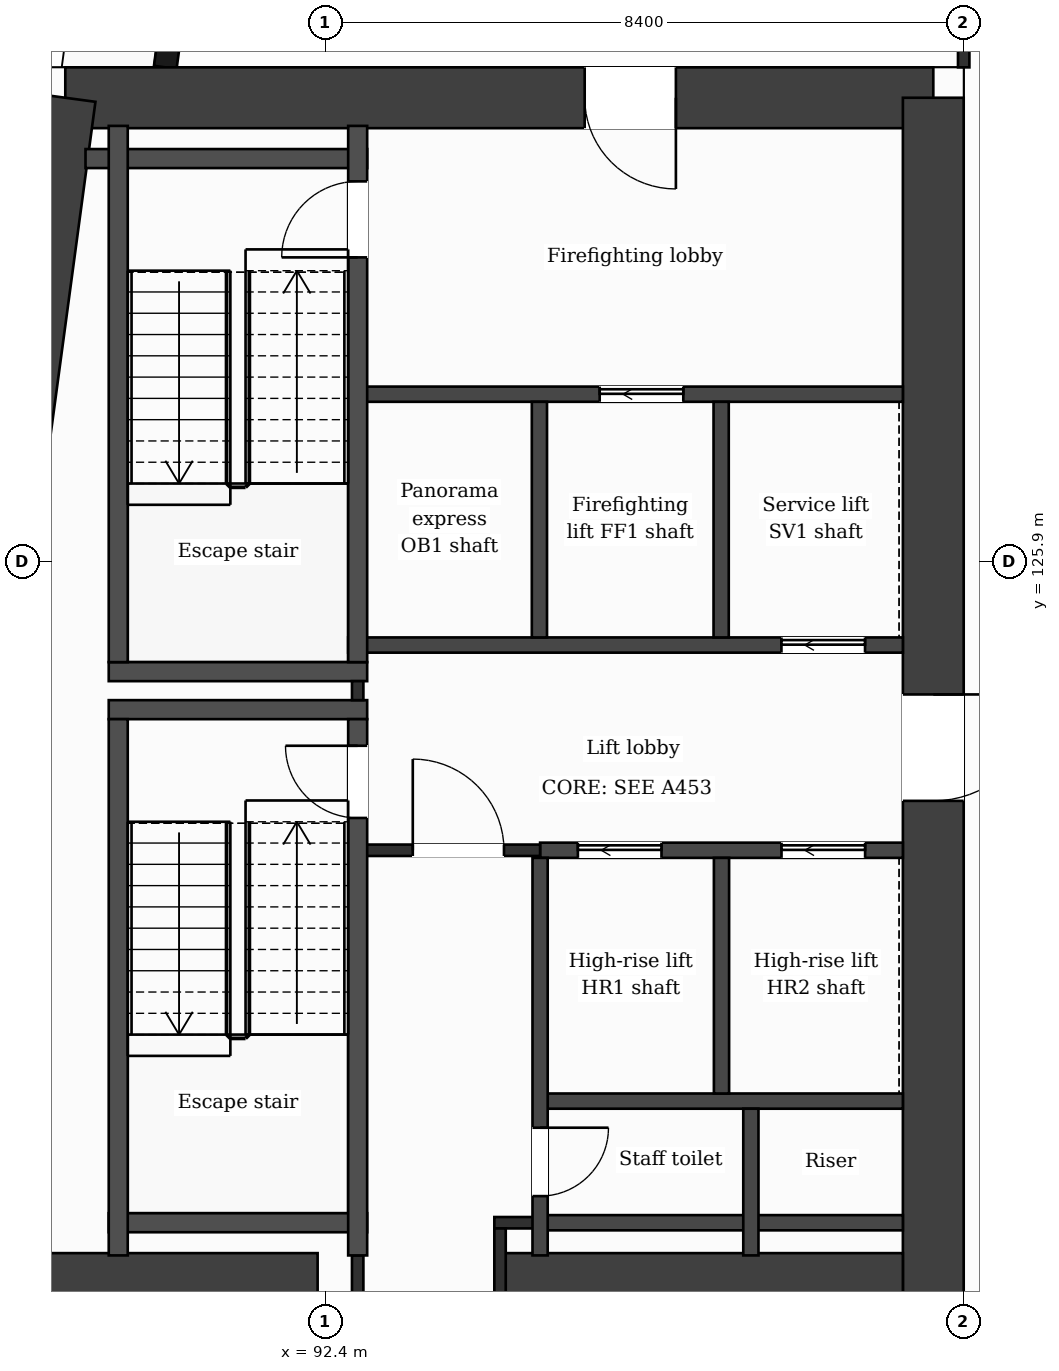
"""IFC4 building model, lengths in metres.
Left out: names, types, materials, properties, quantities, classifications, styles, units other than length and angle.
Written with IfcOpenShell. Run it as: python <this file> out.ifc"""

import sys

from ifc_helpers import new_model, si_unit, direction, frame, frame_2d, origin, place, context, subcontext, project, spatial, rectangle, extrude, element, fill, save


model = new_model("IFC4")
c1 = context("Model", 3, precision=1e-05, world=origin(), true_north=direction((0.0, 1.0)))
c2 = subcontext(c1, "Body", "Model", "MODEL_VIEW")
j1 = project(units=[si_unit("LENGTHUNIT", "METRE"), si_unit("PLANEANGLEUNIT", "RADIAN")], contexts=[c1])
p1 = place(None, origin())
s1 = spatial("IfcSite", under=j1, at=p1, CompositionType="ELEMENT")
p2 = place(p1, origin())
s2 = spatial("IfcBuilding", under=s1, at=p2, CompositionType="ELEMENT")
p3 = place(p2, frame((0.0, 0.0, 217.0)))
s3 = spatial("IfcBuildingStorey", under=s2, at=p3, CompositionType="ELEMENT", Elevation=217.0)
p4 = place(p3, frame((88.98, 132.0, 0.0), z_axis=(0.0, 0.0, 1.0), x_axis=(1.0, 0.0, 0.0)))
e1 = element("IfcWall", 1, at=p4, inside=s3, PredefinedType="SHEAR", context=c2, shape_type="SweptSolid", body=[
    extrude(rectangle(XDim=11.419, YDim=0.8, at=frame_2d((5.71, 0.0))), origin(), (0.0, 0.0, 1.0), 3.7),
])
p5 = place(p4, frame((6.833, 0.0, 0.0)))
e2 = element("IfcOpeningElement", 2, at=p5, cuts=e1, PredefinedType="OPENING", context=c2, shape_type="SweptSolid", body=[
    extrude(rectangle(XDim=1.2, YDim=2.1, at=frame_2d((0.6, 1.05))), frame((0.0, 0.41, 0.0), z_axis=(0.0, -1.0, 0.0), x_axis=(1.0, 0.0, 0.0)), (0.0, 0.0, 1.0), 0.82),
])
p6 = place(p3, frame((100.4, 132.0, 0.0), z_axis=(0.0, 0.0, 1.0), x_axis=(0.0, -1.0, 0.0)))
e3 = element("IfcWall", 3, at=p6, inside=s3, PredefinedType="SHEAR", context=c2, shape_type="SweptSolid", body=[
    extrude(rectangle(XDim=21.2, YDim=0.8, at=frame_2d((10.6, 0.0))), origin(), (0.0, 0.0, 1.0), 3.7),
])
p7 = place(p6, frame((7.85, 0.0, 0.0)))
e4 = element("IfcOpeningElement", 4, at=p7, cuts=e3, PredefinedType="OPENING", context=c2, shape_type="SweptSolid", body=[
    extrude(rectangle(XDim=1.4, YDim=2.1, at=frame_2d((0.7, 1.05))), frame((0.0, 0.41, 0.0), z_axis=(0.0, -1.0, 0.0), x_axis=(1.0, 0.0, 0.0)), (0.0, 0.0, 1.0), 0.82),
])
p8 = place(p3, frame((86.127, 110.8, 0.0), z_axis=(0.0, 0.0, 1.0), x_axis=(0.133408347329, 0.991061154956, 0.0)))
e5 = element("IfcWall", 5, at=p8, inside=s3, PredefinedType="SHEAR", context=c2, shape_type="SweptSolid", body=[
    extrude(rectangle(XDim=21.391, YDim=0.8, at=frame_2d((10.696, 0.0))), origin(), (0.0, 0.0, 1.0), 3.7),
])
p9 = place(p3, frame((87.223, 116.4, 0.0), z_axis=(0.0, 0.0, 1.0), x_axis=(1.0, 0.0, 0.0)))
e6 = element("IfcWall", 6, at=p9, inside=s3, PredefinedType="SHEAR", context=c2, shape_type="SweptSolid", body=[
    extrude(rectangle(XDim=5.077, YDim=0.8, at=frame_2d((2.539, 0.0))), origin(), (0.0, 0.0, 1.0), 3.7),
])
p10 = place(p3, frame((94.7, 116.4, 0.0), z_axis=(0.0, 0.0, 1.0), x_axis=(1.0, 0.0, 0.0)))
e7 = element("IfcWall", 7, at=p10, inside=s3, PredefinedType="SHEAR", context=c2, shape_type="SweptSolid", body=[
    extrude(rectangle(XDim=5.3, YDim=0.8, at=frame_2d((2.65, 0.0))), origin(), (0.0, 0.0, 1.0), 3.7),
])
p11 = place(p3, frame((91.177, 138.95, 0.0), z_axis=(0.0, 0.0, 1.0), x_axis=(-0.133426664613, -0.991058689065, 0.0)))
e8 = element("IfcWall", 8, at=p11, inside=s3, PredefinedType="SOLIDWALL", context=c2, shape_type="SweptSolid", body=[
    extrude(rectangle(XDim=6.609, YDim=0.3, at=frame_2d((3.305, 0.0))), origin(), (0.0, 0.0, 1.0), 3.38),
])
p12 = place(p11, frame((1.039, 0.0, 0.9)))
e9 = element("IfcOpeningElement", 9, at=p12, cuts=e8, PredefinedType="OPENING", context=c2, shape_type="SweptSolid", body=[
    extrude(rectangle(XDim=1.2, YDim=2.1, at=frame_2d((0.6, 1.05))), frame((0.0, 0.16, 0.0), z_axis=(0.0, -1.0, 0.0), x_axis=(1.0, 0.0, 0.0)), (0.0, 0.0, 1.0), 0.32),
])
p13 = place(p11, frame((4.294, 0.0, 0.0)))
e10 = element("IfcOpeningElement", 10, at=p13, cuts=e8, PredefinedType="OPENING", context=c2, shape_type="SweptSolid", body=[
    extrude(rectangle(XDim=1.2, YDim=2.4, at=frame_2d((0.6, 1.2))), frame((0.0, 0.16, 0.0), z_axis=(0.0, -1.0, 0.0), x_axis=(1.0, 0.0, 0.0)), (0.0, 0.0, 1.0), 0.32),
])
p14 = place(p3, frame((95.227, 117.2, 0.0), z_axis=(0.0, 0.0, 1.0), x_axis=(1.0, 0.0, 0.0)))
e11 = element("IfcWall", 11, at=p14, inside=s3, PredefinedType="PARTITIONING", context=c2, shape_type="SweptSolid", body=[
    extrude(rectangle(XDim=4.773, YDim=0.2, at=frame_2d((2.386, 0.0))), origin(), (0.0, 0.0, 1.0), 3.38),
])
p15 = place(p3, frame((94.625, 117.2, 0.0), z_axis=(0.0, 0.0, 1.0), x_axis=(1.0, 0.0, 0.0)))
e12 = element("IfcWall", 12, at=p15, inside=s3, PredefinedType="PARTITIONING", context=c2, shape_type="SweptSolid", body=[
    extrude(rectangle(XDim=0.602, YDim=0.15, at=frame_2d((0.301, 0.0))), origin(), (0.0, 0.0, 1.0), 3.38),
])
p16 = place(p3, frame((89.552, 117.2, 0.0), z_axis=(0.0, 0.0, 1.0), x_axis=(1.0, 0.0, 0.0)))
e13 = element("IfcWall", 13, at=p16, inside=s3, PredefinedType="PARTITIONING", context=c2, shape_type="SweptSolid", body=[
    extrude(rectangle(XDim=3.4, YDim=0.25, at=frame_2d((1.7, 0.0))), origin(), (0.0, 0.0, 1.0), 3.38),
])
p17 = place(p3, frame((95.227, 118.8, 0.0), z_axis=(0.0, 0.0, 1.0), x_axis=(1.0, 0.0, 0.0)))
e14 = element("IfcWall", 14, at=p17, inside=s3, PredefinedType="PARTITIONING", context=c2, shape_type="SweptSolid", body=[
    extrude(rectangle(XDim=4.773, YDim=0.2, at=frame_2d((2.386, 0.0))), origin(), (0.0, 0.0, 1.0), 3.38),
])
p18 = place(p3, frame((95.227, 122.1, 0.0), z_axis=(0.0, 0.0, 1.0), x_axis=(1.0, 0.0, 0.0)))
e15 = element("IfcWall", 15, at=p18, inside=s3, PredefinedType="PARTITIONING", context=c2, shape_type="SweptSolid", body=[
    extrude(rectangle(XDim=4.773, YDim=0.2, at=frame_2d((2.386, 0.0))), origin(), (0.0, 0.0, 1.0), 3.38),
])
p19 = place(p18, frame((0.497, 0.0, 0.0)))
e16 = element("IfcOpeningElement", 16, at=p19, cuts=e15, PredefinedType="OPENING", context=c2, shape_type="SweptSolid", body=[
    extrude(rectangle(XDim=1.1, YDim=2.1, at=frame_2d((0.55, 1.05))), frame((0.0, 0.11, 0.0), z_axis=(0.0, -1.0, 0.0), x_axis=(1.0, 0.0, 0.0)), (0.0, 0.0, 1.0), 0.22),
])
p20 = place(p18, frame((3.176, 0.0, 0.0)))
e17 = element("IfcOpeningElement", 17, at=p20, cuts=e15, PredefinedType="OPENING", context=c2, shape_type="SweptSolid", body=[
    extrude(rectangle(XDim=1.1, YDim=2.1, at=frame_2d((0.55, 1.05))), frame((0.0, 0.11, 0.0), z_axis=(0.0, -1.0, 0.0), x_axis=(1.0, 0.0, 0.0)), (0.0, 0.0, 1.0), 0.22),
])
p21 = place(p3, frame((92.827, 122.1, 0.0), z_axis=(0.0, 0.0, 1.0), x_axis=(1.0, 0.0, 0.0)))
e18 = element("IfcWall", 18, at=p21, inside=s3, PredefinedType="PARTITIONING", context=c2, shape_type="SweptSolid", body=[
    extrude(rectangle(XDim=2.4, YDim=0.15, at=frame_2d((1.2, 0.0))), origin(), (0.0, 0.0, 1.0), 3.38),
])
p22 = place(p21, frame((0.725, 0.0, 0.0)))
e19 = element("IfcOpeningElement", 19, at=p22, cuts=e18, PredefinedType="OPENING", context=c2, shape_type="SweptSolid", body=[
    extrude(rectangle(XDim=1.2, YDim=2.1, at=frame_2d((0.6, 1.05))), frame((0.0, 0.085, 0.0), z_axis=(0.0, -1.0, 0.0), x_axis=(1.0, 0.0, 0.0)), (0.0, 0.0, 1.0), 0.17),
])
for number, where, z_axis, x_axis in (
    (20, (89.552, 123.95, 0.0), (0.0, 0.0, 1.0), (1.0, 0.0, 0.0)),
    (21, (89.552, 124.45, 0.0), (0.0, 0.0, 1.0), (1.0, 0.0, 0.0)),
):
    element("IfcWall", number, at=place(p3, frame(where, z_axis=z_axis, x_axis=x_axis)), inside=s3, PredefinedType="PARTITIONING", context=c2, shape_type="SweptSolid", body=[
        extrude(rectangle(XDim=3.4, YDim=0.25, at=frame_2d((1.7, 0.0))), origin(), (0.0, 0.0, 1.0), 3.38),
    ])
p23 = place(p3, frame((92.702, 124.8, 0.0), z_axis=(0.0, 0.0, 1.0), x_axis=(1.0, 0.0, 0.0)))
e22 = element("IfcWall", 22, at=p23, inside=s3, PredefinedType="PARTITIONING", context=c2, shape_type="SweptSolid", body=[
    extrude(rectangle(XDim=7.298, YDim=0.2, at=frame_2d((3.649, 0.0))), origin(), (0.0, 0.0, 1.0), 3.38),
])
p24 = place(p23, frame((5.7, 0.0, 0.0)))
e23 = element("IfcOpeningElement", 23, at=p24, cuts=e22, PredefinedType="OPENING", context=c2, shape_type="SweptSolid", body=[
    extrude(rectangle(XDim=1.1, YDim=2.1, at=frame_2d((0.55, 1.05))), frame((0.0, 0.11, 0.0), z_axis=(0.0, -1.0, 0.0), x_axis=(1.0, 0.0, 0.0)), (0.0, 0.0, 1.0), 0.22),
])
p25 = place(p3, frame((92.827, 128.1, 0.0), z_axis=(0.0, 0.0, 1.0), x_axis=(1.0, 0.0, 0.0)))
e24 = element("IfcWall", 24, at=p25, inside=s3, PredefinedType="PARTITIONING", context=c2, shape_type="SweptSolid", body=[
    extrude(rectangle(XDim=7.173, YDim=0.2, at=frame_2d((3.586, 0.0))), origin(), (0.0, 0.0, 1.0), 3.38),
])
p26 = place(p25, frame((3.184, 0.0, 0.0)))
e25 = element("IfcOpeningElement", 25, at=p26, cuts=e24, PredefinedType="OPENING", context=c2, shape_type="SweptSolid", body=[
    extrude(rectangle(XDim=1.1, YDim=2.1, at=frame_2d((0.55, 1.05))), frame((0.0, 0.11, 0.0), z_axis=(0.0, -1.0, 0.0), x_axis=(1.0, 0.0, 0.0)), (0.0, 0.0, 1.0), 0.22),
])
p27 = place(p3, frame((89.246, 131.2, 0.0), z_axis=(0.0, 0.0, 1.0), x_axis=(1.0, 0.0, 0.0)))
e26 = element("IfcWall", 26, at=p27, inside=s3, PredefinedType="PARTITIONING", context=c2, shape_type="SweptSolid", body=[
    extrude(rectangle(XDim=3.706, YDim=0.25, at=frame_2d((1.853, 0.0))), origin(), (0.0, 0.0, 1.0), 3.38),
])
for number, where, z_axis, x_axis in (
    (27, (89.677, 116.77, 0.0), (0.0, 0.0, 1.0), (0.0, 1.0, 0.0)),
    (28, (89.677, 124.575, 0.0), (0.0, 0.0, 1.0), (0.0, 1.0, 0.0)),
):
    element("IfcWall", number, at=place(p3, frame(where, z_axis=z_axis, x_axis=x_axis)), inside=s3, PredefinedType="PARTITIONING", context=c2, shape_type="SweptSolid", body=[
        extrude(rectangle(XDim=7.055, YDim=0.25, at=frame_2d((3.527, 0.0))), origin(), (0.0, 0.0, 1.0), 3.38),
    ])
p28 = place(p3, frame((92.827, 116.0, 0.0), z_axis=(0.0, 0.0, 1.0), x_axis=(0.0, 1.0, 0.0)))
e29 = element("IfcWall", 29, at=p28, inside=s3, PredefinedType="PARTITIONING", context=c2, shape_type="SweptSolid", body=[
    extrude(rectangle(XDim=0.77, YDim=0.15, at=frame_2d((0.385, 0.0))), origin(), (0.0, 0.0, 1.0), 3.38),
])
p29 = place(p3, frame((92.827, 124.075, 0.0), z_axis=(0.0, 0.0, 1.0), x_axis=(0.0, 1.0, 0.0)))
e30 = element("IfcWall", 30, at=p29, inside=s3, PredefinedType="PARTITIONING", context=c2, shape_type="SweptSolid", body=[
    extrude(rectangle(XDim=0.25, YDim=0.15, at=frame_2d((0.125, 0.0))), origin(), (0.0, 0.0, 1.0), 3.38),
])
p30 = place(p3, frame((92.827, 116.77, 0.0), z_axis=(0.0, 0.0, 1.0), x_axis=(0.0, 1.0, 0.0)))
e31 = element("IfcWall", 31, at=p30, inside=s3, PredefinedType="PARTITIONING", context=c2, shape_type="SweptSolid", body=[
    extrude(rectangle(XDim=7.055, YDim=0.25, at=frame_2d((3.527, 0.0))), origin(), (0.0, 0.0, 1.0), 3.38),
])
p31 = place(p30, frame((5.755, 0.0, 0.0)))
e32 = element("IfcOpeningElement", 32, at=p31, cuts=e31, PredefinedType="OPENING", context=c2, shape_type="SweptSolid", body=[
    extrude(rectangle(XDim=0.95, YDim=2.1, at=frame_2d((0.475, 1.05))), frame((0.0, 0.135, 0.0), z_axis=(0.0, -1.0, 0.0), x_axis=(1.0, 0.0, 0.0)), (0.0, 0.0, 1.0), 0.27),
])
p32 = place(p3, frame((92.827, 124.575, 0.0), z_axis=(0.0, 0.0, 1.0), x_axis=(0.0, 1.0, 0.0)))
e33 = element("IfcWall", 33, at=p32, inside=s3, PredefinedType="PARTITIONING", context=c2, shape_type="SweptSolid", body=[
    extrude(rectangle(XDim=7.055, YDim=0.25, at=frame_2d((3.527, 0.0))), origin(), (0.0, 0.0, 1.0), 3.38),
])
p33 = place(p32, frame((5.325, 0.0, 0.0)))
e34 = element("IfcOpeningElement", 34, at=p33, cuts=e33, PredefinedType="OPENING", context=c2, shape_type="SweptSolid", body=[
    extrude(rectangle(XDim=1.0, YDim=2.1, at=frame_2d((0.5, 1.05))), frame((0.0, 0.135, 0.0), z_axis=(0.0, -1.0, 0.0), x_axis=(1.0, 0.0, 0.0)), (0.0, 0.0, 1.0), 0.27),
])
p34 = place(p3, frame((94.7, 116.0, 0.0), z_axis=(0.0, 0.0, 1.0), x_axis=(0.0, 1.0, 0.0)))
e35 = element("IfcWall", 35, at=p34, inside=s3, PredefinedType="PARTITIONING", context=c2, shape_type="SweptSolid", body=[
    extrude(rectangle(XDim=1.125, YDim=0.15, at=frame_2d((0.562, 0.0))), origin(), (0.0, 0.0, 1.0), 3.38),
])
p35 = place(p3, frame((95.218, 124.9, 0.0), z_axis=(0.0, 0.0, 1.0), x_axis=(0.0, 1.0, 0.0)))
e36 = element("IfcWall", 36, at=p35, inside=s3, PredefinedType="PARTITIONING", context=c2, shape_type="SweptSolid", body=[
    extrude(rectangle(XDim=3.1, YDim=0.2, at=frame_2d((1.55, 0.0))), origin(), (0.0, 0.0, 1.0), 3.38),
])
p36 = place(p3, frame((95.227, 116.77, 0.0), z_axis=(0.0, 0.0, 1.0), x_axis=(0.0, 1.0, 0.0)))
e37 = element("IfcWall", 37, at=p36, inside=s3, PredefinedType="PARTITIONING", context=c2, shape_type="SweptSolid", body=[
    extrude(rectangle(XDim=5.23, YDim=0.2, at=frame_2d((2.615, 0.0))), origin(), (0.0, 0.0, 1.0), 3.38),
])
p37 = place(p36, frame((0.78, 0.0, 0.0)))
e38 = element("IfcOpeningElement", 38, at=p37, cuts=e37, PredefinedType="OPENING", context=c2, shape_type="SweptSolid", body=[
    extrude(rectangle(XDim=0.9, YDim=2.1, at=frame_2d((0.45, 1.05))), frame((0.0, 0.11, 0.0), z_axis=(0.0, -1.0, 0.0), x_axis=(1.0, 0.0, 0.0)), (0.0, 0.0, 1.0), 0.22),
])
for number, where, z_axis, x_axis in (
    (39, (97.609, 124.9, 0.0), (0.0, 0.0, 1.0), (0.0, 1.0, 0.0)),
    (40, (97.614, 118.9, 0.0), (0.0, 0.0, 1.0), (0.0, 1.0, 0.0)),
):
    element("IfcWall", number, at=place(p3, frame(where, z_axis=z_axis, x_axis=x_axis)), inside=s3, PredefinedType="PARTITIONING", context=c2, shape_type="SweptSolid", body=[
        extrude(rectangle(XDim=3.1, YDim=0.2, at=frame_2d((1.55, 0.0))), origin(), (0.0, 0.0, 1.0), 3.38),
    ])
p38 = place(p3, frame((98.0, 116.77, 0.0), z_axis=(0.0, 0.0, 1.0), x_axis=(0.0, 1.0, 0.0)))
e41 = element("IfcWall", 41, at=p38, inside=s3, PredefinedType="PARTITIONING", context=c2, shape_type="SweptSolid", body=[
    extrude(rectangle(XDim=1.93, YDim=0.2, at=frame_2d((0.965, 0.0))), origin(), (0.0, 0.0, 1.0), 3.38),
])
p39 = place(p3, frame((100.8, 132.4, 0.0), z_axis=(0.0, 0.0, 1.0), x_axis=(0.0, 1.0, 0.0)))
e42 = element("IfcWall", 42, at=p39, inside=s3, PredefinedType="PARTITIONING", context=c2, shape_type="SweptSolid", body=[
    extrude(rectangle(XDim=1.325, YDim=0.15, at=frame_2d((0.663, 0.0))), origin(), (0.0, 0.0, 1.0), 3.38),
])
p40 = place(p22, origin())
e43 = element("IfcDoor", 43, at=p40, inside=s3, OperationType="SINGLE_SWING_LEFT", PredefinedType="DOOR", context=c2, shape_type="SweptSolid", body=[
    extrude(rectangle(XDim=1.2, YDim=2.1, at=frame_2d((0.6, 1.05))), frame((0.0, 0.025, 0.0), z_axis=(0.0, -1.0, 0.0), x_axis=(1.0, 0.0, 0.0)), (0.0, 0.0, 1.0), 0.05),
])
fill(e19, e43)
p41 = place(p19, origin())
e44 = element("IfcDoor", 44, at=p41, inside=s3, OperationType="SLIDING_TO_LEFT", PredefinedType="DOOR", context=c2, shape_type="SweptSolid", body=[
    extrude(rectangle(XDim=1.1, YDim=2.1, at=frame_2d((0.55, 1.05))), frame((0.0, 0.025, 0.0), z_axis=(0.0, -1.0, 0.0), x_axis=(1.0, 0.0, 0.0)), (0.0, 0.0, 1.0), 0.05),
])
fill(e16, e44)
p42 = place(p20, origin())
e45 = element("IfcDoor", 45, at=p42, inside=s3, OperationType="SLIDING_TO_LEFT", PredefinedType="DOOR", context=c2, shape_type="SweptSolid", body=[
    extrude(rectangle(XDim=1.1, YDim=2.1, at=frame_2d((0.55, 1.05))), frame((0.0, 0.025, 0.0), z_axis=(0.0, -1.0, 0.0), x_axis=(1.0, 0.0, 0.0)), (0.0, 0.0, 1.0), 0.05),
])
fill(e17, e45)
p43 = place(p26, origin())
e46 = element("IfcDoor", 46, at=p43, inside=s3, OperationType="SLIDING_TO_LEFT", PredefinedType="DOOR", context=c2, shape_type="SweptSolid", body=[
    extrude(rectangle(XDim=1.1, YDim=2.1, at=frame_2d((0.55, 1.05))), frame((0.0, 0.025, 0.0), z_axis=(0.0, -1.0, 0.0), x_axis=(1.0, 0.0, 0.0)), (0.0, 0.0, 1.0), 0.05),
])
fill(e25, e46)
p44 = place(p24, origin())
e47 = element("IfcDoor", 47, at=p44, inside=s3, OperationType="SLIDING_TO_LEFT", PredefinedType="DOOR", context=c2, shape_type="SweptSolid", body=[
    extrude(rectangle(XDim=1.1, YDim=2.1, at=frame_2d((0.55, 1.05))), frame((0.0, 0.025, 0.0), z_axis=(0.0, -1.0, 0.0), x_axis=(1.0, 0.0, 0.0)), (0.0, 0.0, 1.0), 0.05),
])
fill(e23, e47)
p45 = place(p31, origin())
e48 = element("IfcDoor", 48, at=p45, inside=s3, OperationType="SINGLE_SWING_RIGHT", PredefinedType="DOOR", context=c2, shape_type="SweptSolid", body=[
    extrude(rectangle(XDim=0.95, YDim=2.1, at=frame_2d((0.475, 1.05))), frame((0.0, 0.025, 0.0), z_axis=(0.0, -1.0, 0.0), x_axis=(1.0, 0.0, 0.0)), (0.0, 0.0, 1.0), 0.05),
])
fill(e32, e48)
p46 = place(p33, origin())
e49 = element("IfcDoor", 49, at=p46, inside=s3, OperationType="SINGLE_SWING_LEFT", PredefinedType="DOOR", context=c2, shape_type="SweptSolid", body=[
    extrude(rectangle(XDim=1.0, YDim=2.1, at=frame_2d((0.5, 1.05))), frame((0.0, 0.025, 0.0), z_axis=(0.0, -1.0, 0.0), x_axis=(1.0, 0.0, 0.0)), (0.0, 0.0, 1.0), 0.05),
])
fill(e34, e49)
p47 = place(p37, origin())
e50 = element("IfcDoor", 50, at=p47, inside=s3, OperationType="SINGLE_SWING_RIGHT", PredefinedType="DOOR", context=c2, shape_type="SweptSolid", body=[
    extrude(rectangle(XDim=0.9, YDim=2.1, at=frame_2d((0.45, 1.05))), frame((0.0, 0.025, 0.0), z_axis=(0.0, -1.0, 0.0), x_axis=(1.0, 0.0, 0.0)), (0.0, 0.0, 1.0), 0.05),
])
fill(e38, e50)
p48 = place(p5, origin())
e51 = element("IfcDoor", 51, at=p48, inside=s3, OperationType="SINGLE_SWING_RIGHT", PredefinedType="DOOR", context=c2, shape_type="SweptSolid", body=[
    extrude(rectangle(XDim=1.2, YDim=2.1, at=frame_2d((0.6, 1.05))), frame((0.0, 0.025, 0.0), z_axis=(0.0, -1.0, 0.0), x_axis=(1.0, 0.0, 0.0)), (0.0, 0.0, 1.0), 0.05),
])
fill(e2, e51)
p49 = place(p7, origin())
e52 = element("IfcDoor", 52, at=p49, inside=s3, OperationType="SINGLE_SWING_LEFT", PredefinedType="DOOR", context=c2, shape_type="SweptSolid", body=[
    extrude(rectangle(XDim=1.4, YDim=2.1, at=frame_2d((0.7, 1.05))), frame((0.0, 0.025, 0.0), z_axis=(0.0, -1.0, 0.0), x_axis=(1.0, 0.0, 0.0)), (0.0, 0.0, 1.0), 0.05),
])
fill(e4, e52)
save(model, sys.argv[1])
